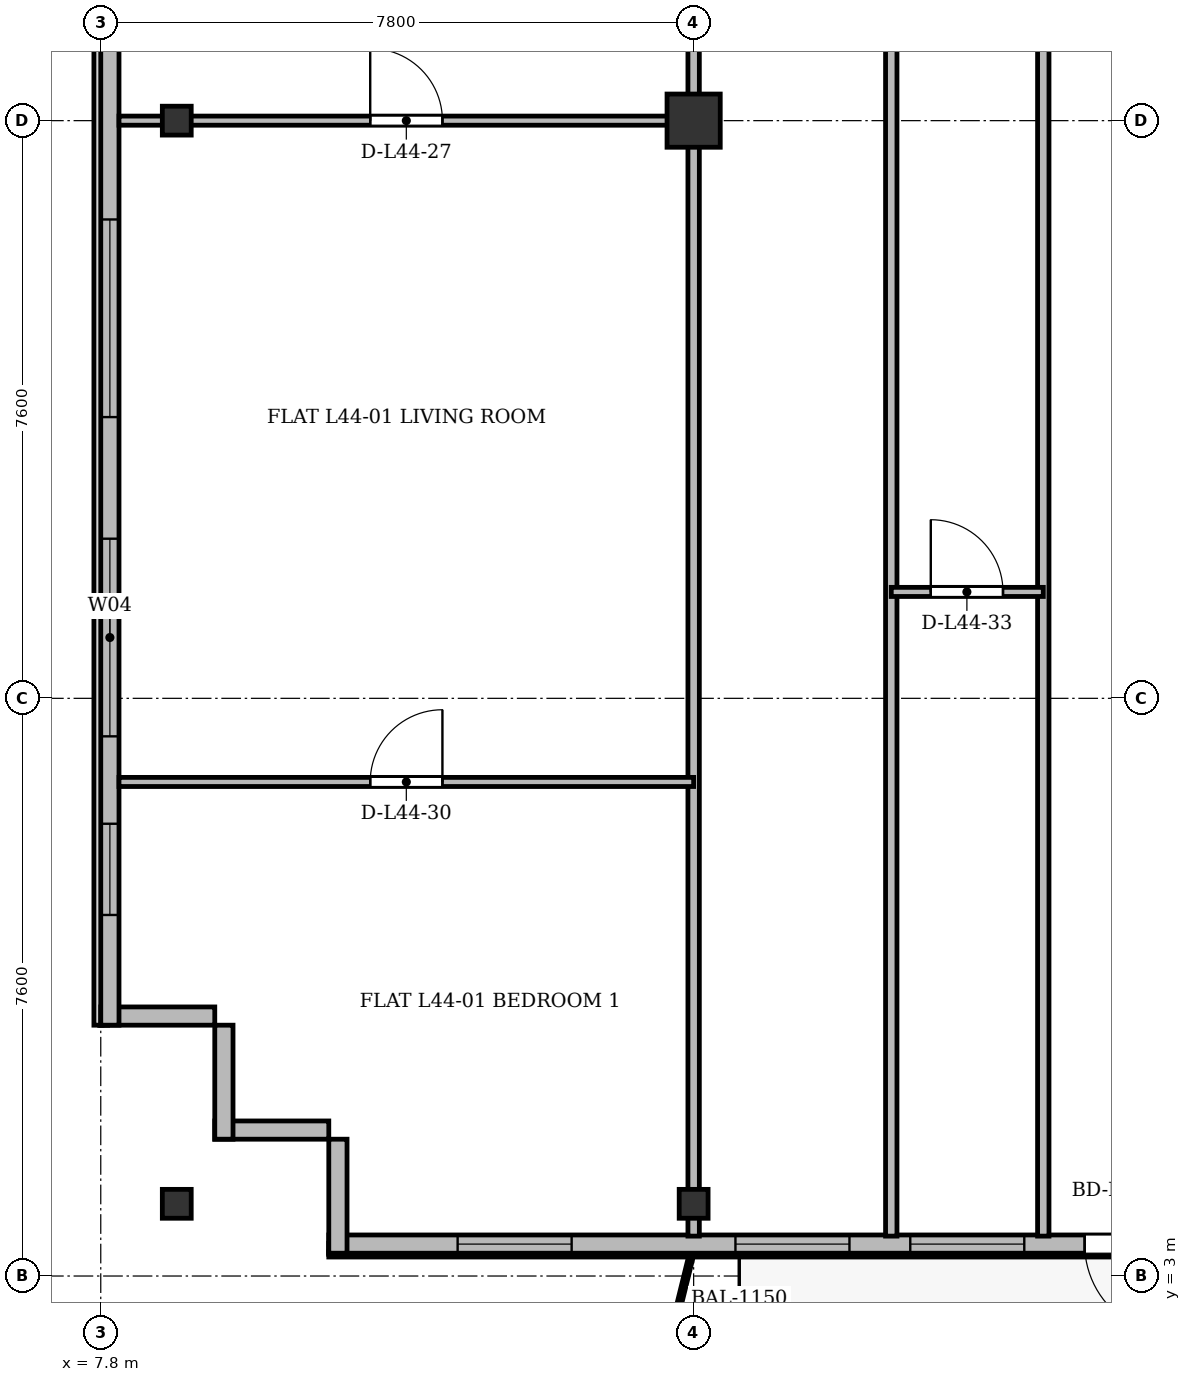
"""IFC4 building model, lengths in metres.
Left out: names, types, materials, properties, quantities, classifications, styles, units other than length and angle.
Written with IfcOpenShell. Run it as: python <this file> out.ifc"""

import sys

from ifc_helpers import new_model, si_unit, direction, frame, frame_2d, origin, origin_2d, place, context, subcontext, project, spatial, rectangle, i_section, extrude, source, transform, mapped, element, fill, save


model = new_model("IFC4")
c1 = context("Model", 3, precision=1e-05, world=origin(), true_north=direction((0.0, 1.0)))
c2 = subcontext(c1, "Body", "Model", "MODEL_VIEW")
j1 = project(units=[si_unit("LENGTHUNIT", "METRE"), si_unit("PLANEANGLEUNIT", "RADIAN")], contexts=[c1])
p1 = place(None, origin())
s1 = spatial("IfcSite", under=j1, at=p1, CompositionType="ELEMENT")
p2 = place(p1, origin())
s2 = spatial("IfcBuilding", under=s1, at=p2, CompositionType="ELEMENT")
p3 = place(p2, frame((0.0, 0.0, 168.1)))
s3 = spatial("IfcBuildingStorey", under=s2, at=p3, CompositionType="ELEMENT", Elevation=168.1)
m1 = source(origin(), c2, "Body", "SweptSolid", [
    extrude(i_section(OverallWidth=0.38, OverallDepth=0.38, WebThickness=0.02, FlangeThickness=0.03, at=origin_2d()), origin(), (0.0, 0.0, 1.0), 3.6),
])
for number, where, z_axis, x_axis in (
    (1, (8.8, 3.95, 0.0), (0.0, 0.0, 1.0), (1.0, 0.0, 0.0)),
    (2, (8.8, 18.2, 0.0), (0.0, 0.0, 1.0), (1.0, 0.0, 0.0)),
    (3, (15.6, 3.95, 0.0), (0.0, 0.0, 1.0), (1.0, 0.0, 0.0)),
):
    element("IfcColumn", number, at=place(p3, frame(where, z_axis=z_axis, x_axis=x_axis)), inside=s3, PredefinedType="COLUMN", context=c2, shape_type="MappedRepresentation", body=[
        mapped(m1, transform((0.0, 0.0, 0.0), x_axis=(1.0, 0.0, 0.0), y_axis=(0.0, 1.0, 0.0), z_axis=(0.0, 0.0, 1.0), scale=1.0)),
    ])
m2 = source(origin(), c2, "Body", "SweptSolid", [
    extrude(rectangle(XDim=0.7, YDim=0.7, at=origin_2d()), origin(), (0.0, 0.0, 1.0), 3.6),
])
p4 = place(p3, frame((15.6, 18.2, 0.0), z_axis=(0.0, 0.0, 1.0), x_axis=(1.0, 0.0, 0.0)))
e4 = element("IfcColumn", 4, at=p4, inside=s3, PredefinedType="COLUMN", context=c2, shape_type="MappedRepresentation", body=[
    mapped(m2, transform((0.0, 0.0, 0.0), x_axis=(1.0, 0.0, 0.0), y_axis=(0.0, 1.0, 0.0), z_axis=(0.0, 0.0, 1.0), scale=1.0)),
])
for number, where, z_axis, x_axis in (
    (5, (10.8, 4.92, 0.0), (0.0, 0.0, 1.0), (-1.0, 0.0, 0.0)),
    (6, (9.42, 4.8, 0.0), (0.0, 0.0, 1.0), (0.0, 1.0, 0.0)),
):
    element("IfcWall", number, at=place(p3, frame(where, z_axis=z_axis, x_axis=x_axis)), inside=s3, PredefinedType="SOLIDWALL", context=c2, shape_type="SweptSolid", body=[
        extrude(rectangle(XDim=1.5, YDim=0.24, at=frame_2d((0.75, 0.0))), origin(), (0.0, 0.0, 1.0), 3.35),
    ])
p5 = place(p3, frame((9.3, 6.42, 0.0), z_axis=(0.0, 0.0, 1.0), x_axis=(-1.0, 0.0, 0.0)))
e7 = element("IfcWall", 7, at=p5, inside=s3, PredefinedType="SOLIDWALL", context=c2, shape_type="SweptSolid", body=[
    extrude(rectangle(XDim=1.5, YDim=0.24, at=frame_2d((0.75, 0.0))), origin(), (0.0, 0.0, 1.0), 2.85),
])
p6 = place(p3, frame((7.92, 6.3, 0.0), z_axis=(0.0, 0.0, 1.0), x_axis=(0.0, 1.0, 0.0)))
e8 = element("IfcWall", 8, at=p6, inside=s3, PredefinedType="SOLIDWALL", context=c2, shape_type="SweptSolid", body=[
    extrude(rectangle(XDim=39.2, YDim=0.24, at=frame_2d((19.6, 0.0))), origin(), (0.0, 0.0, 1.0), 3.35),
])
p7 = place(p6, frame((1.45, 0.0, 0.92)))
e9 = element("IfcOpeningElement", 9, at=p7, cuts=e8, PredefinedType="OPENING", context=c2, shape_type="SweptSolid", body=[
    extrude(rectangle(XDim=1.2, YDim=1.65, at=frame_2d((0.6, 0.825))), frame((0.0, 0.13, 0.0), z_axis=(0.0, -1.0, 0.0), x_axis=(1.0, 0.0, 0.0)), (0.0, 0.0, 1.0), 0.26),
])
p8 = place(p6, frame((3.8, 0.0, 0.92)))
e10 = element("IfcOpeningElement", 10, at=p8, cuts=e8, PredefinedType="OPENING", context=c2, shape_type="SweptSolid", body=[
    extrude(rectangle(XDim=2.6, YDim=1.9, at=frame_2d((1.3, 0.95))), frame((0.0, 0.13, 0.0), z_axis=(0.0, -1.0, 0.0), x_axis=(1.0, 0.0, 0.0)), (0.0, 0.0, 1.0), 0.26),
])
p9 = place(p6, frame((8.0, 0.0, 0.92)))
e11 = element("IfcOpeningElement", 11, at=p9, cuts=e8, PredefinedType="OPENING", context=c2, shape_type="SweptSolid", body=[
    extrude(rectangle(XDim=2.6, YDim=1.9, at=frame_2d((1.3, 0.95))), frame((0.0, 0.13, 0.0), z_axis=(0.0, -1.0, 0.0), x_axis=(1.0, 0.0, 0.0)), (0.0, 0.0, 1.0), 0.26),
])
p10 = place(p6, frame((15.2, 0.0, 0.92)))
e12 = element("IfcOpeningElement", 12, at=p10, cuts=e8, PredefinedType="OPENING", context=c2, shape_type="SweptSolid", body=[
    extrude(rectangle(XDim=2.6, YDim=1.9, at=frame_2d((1.3, 0.95))), frame((0.0, 0.13, 0.0), z_axis=(0.0, -1.0, 0.0), x_axis=(1.0, 0.0, 0.0)), (0.0, 0.0, 1.0), 0.26),
])
p11 = place(p6, frame((29.2, 0.0, 0.92)))
e13 = element("IfcOpeningElement", 13, at=p11, cuts=e8, PredefinedType="OPENING", context=c2, shape_type="SweptSolid", body=[
    extrude(rectangle(XDim=2.6, YDim=1.9, at=frame_2d((1.3, 0.95))), frame((0.0, 0.13, 0.0), z_axis=(0.0, -1.0, 0.0), x_axis=(1.0, 0.0, 0.0)), (0.0, 0.0, 1.0), 0.26),
])
p12 = place(p6, frame((36.85, 0.0, 0.92)))
e14 = element("IfcOpeningElement", 14, at=p12, cuts=e8, PredefinedType="OPENING", context=c2, shape_type="SweptSolid", body=[
    extrude(rectangle(XDim=1.2, YDim=1.65, at=frame_2d((0.6, 0.825))), frame((0.0, 0.13, 0.0), z_axis=(0.0, -1.0, 0.0), x_axis=(1.0, 0.0, 0.0)), (0.0, 0.0, 1.0), 0.26),
])
p13 = place(p3, frame((63.6, 3.42, 0.0), z_axis=(0.0, 0.0, 1.0), x_axis=(-1.0, 0.0, 0.0)))
e15 = element("IfcWall", 15, at=p13, inside=s3, PredefinedType="SOLIDWALL", context=c2, shape_type="SweptSolid", body=[
    extrude(rectangle(XDim=52.8, YDim=0.24, at=frame_2d((26.4, 0.0))), origin(), (0.0, 0.0, 1.0), 3.35),
])
p14 = place(p13, frame((1.62, 0.0, 0.9)))
e16 = element("IfcOpeningElement", 16, at=p14, cuts=e15, PredefinedType="OPENING", context=c2, shape_type="SweptSolid", body=[
    extrude(rectangle(XDim=1.65, YDim=1.85, at=frame_2d((0.825, 0.925))), frame((0.0, 0.13, 0.0), z_axis=(0.0, -1.0, 0.0), x_axis=(1.0, 0.0, 0.0)), (0.0, 0.0, 1.0), 0.26),
])
p15 = place(p13, frame((5.2, 0.0, 0.9)))
e17 = element("IfcOpeningElement", 17, at=p15, cuts=e15, PredefinedType="OPENING", context=c2, shape_type="SweptSolid", body=[
    extrude(rectangle(XDim=1.8, YDim=1.8, at=frame_2d((0.9, 0.9))), frame((0.0, 0.13, 0.0), z_axis=(0.0, -1.0, 0.0), x_axis=(1.0, 0.0, 0.0)), (0.0, 0.0, 1.0), 0.26),
])
p16 = place(p13, frame((7.65, 0.0, 0.9)))
e18 = element("IfcOpeningElement", 18, at=p16, cuts=e15, PredefinedType="OPENING", context=c2, shape_type="SweptSolid", body=[
    extrude(rectangle(XDim=1.5, YDim=1.75, at=frame_2d((0.75, 0.875))), frame((0.0, 0.13, 0.0), z_axis=(0.0, -1.0, 0.0), x_axis=(1.0, 0.0, 0.0)), (0.0, 0.0, 1.0), 0.26),
])
p17 = place(p13, frame((10.25, 0.0, 0.9)))
e19 = element("IfcOpeningElement", 19, at=p17, cuts=e15, PredefinedType="OPENING", context=c2, shape_type="SweptSolid", body=[
    extrude(rectangle(XDim=1.5, YDim=1.75, at=frame_2d((0.75, 0.875))), frame((0.0, 0.13, 0.0), z_axis=(0.0, -1.0, 0.0), x_axis=(1.0, 0.0, 0.0)), (0.0, 0.0, 1.0), 0.26),
])
p18 = place(p13, frame((13.62, 0.0, 0.0)))
e20 = element("IfcOpeningElement", 20, at=p18, cuts=e15, PredefinedType="OPENING", context=c2, shape_type="SweptSolid", body=[
    extrude(rectangle(XDim=1.2, YDim=2.2, at=frame_2d((0.6, 1.1))), frame((0.0, 0.13, 0.0), z_axis=(0.0, -1.0, 0.0), x_axis=(1.0, 0.0, 0.0)), (0.0, 0.0, 1.0), 0.26),
])
p19 = place(p13, frame((15.375, 0.0, 0.9)))
e21 = element("IfcOpeningElement", 21, at=p19, cuts=e15, PredefinedType="OPENING", context=c2, shape_type="SweptSolid", body=[
    extrude(rectangle(XDim=1.65, YDim=1.85, at=frame_2d((0.825, 0.925))), frame((0.0, 0.13, 0.0), z_axis=(0.0, -1.0, 0.0), x_axis=(1.0, 0.0, 0.0)), (0.0, 0.0, 1.0), 0.26),
])
p20 = place(p13, frame((17.7, 0.0, 0.9)))
e22 = element("IfcOpeningElement", 22, at=p20, cuts=e15, PredefinedType="OPENING", context=c2, shape_type="SweptSolid", body=[
    extrude(rectangle(XDim=1.8, YDim=1.8, at=frame_2d((0.9, 0.9))), frame((0.0, 0.13, 0.0), z_axis=(0.0, -1.0, 0.0), x_axis=(1.0, 0.0, 0.0)), (0.0, 0.0, 1.0), 0.26),
])
p21 = place(p13, frame((22.0, 0.0, 0.9)))
e23 = element("IfcOpeningElement", 23, at=p21, cuts=e15, PredefinedType="OPENING", context=c2, shape_type="SweptSolid", body=[
    extrude(rectangle(XDim=2.2, YDim=1.8, at=frame_2d((1.1, 0.9))), frame((0.0, 0.13, 0.0), z_axis=(0.0, -1.0, 0.0), x_axis=(1.0, 0.0, 0.0)), (0.0, 0.0, 1.0), 0.26),
])
p22 = place(p13, frame((28.95, 0.0, 0.9)))
e24 = element("IfcOpeningElement", 24, at=p22, cuts=e15, PredefinedType="OPENING", context=c2, shape_type="SweptSolid", body=[
    extrude(rectangle(XDim=1.5, YDim=1.75, at=frame_2d((0.75, 0.875))), frame((0.0, 0.13, 0.0), z_axis=(0.0, -1.0, 0.0), x_axis=(1.0, 0.0, 0.0)), (0.0, 0.0, 1.0), 0.26),
])
p23 = place(p13, frame((35.6, 0.0, 0.9)))
e25 = element("IfcOpeningElement", 25, at=p23, cuts=e15, PredefinedType="OPENING", context=c2, shape_type="SweptSolid", body=[
    extrude(rectangle(XDim=2.0, YDim=1.95, at=frame_2d((1.0, 0.975))), frame((0.0, 0.13, 0.0), z_axis=(0.0, -1.0, 0.0), x_axis=(1.0, 0.0, 0.0)), (0.0, 0.0, 1.0), 0.26),
])
p24 = place(p13, frame((41.656, 0.0, 0.0)))
e26 = element("IfcOpeningElement", 26, at=p24, cuts=e15, PredefinedType="OPENING", context=c2, shape_type="SweptSolid", body=[
    extrude(rectangle(XDim=1.2, YDim=2.2, at=frame_2d((0.6, 1.1))), frame((0.0, 0.13, 0.0), z_axis=(0.0, -1.0, 0.0), x_axis=(1.0, 0.0, 0.0)), (0.0, 0.0, 1.0), 0.26),
])
p25 = place(p13, frame((43.65, 0.0, 0.9)))
e27 = element("IfcOpeningElement", 27, at=p25, cuts=e15, PredefinedType="OPENING", context=c2, shape_type="SweptSolid", body=[
    extrude(rectangle(XDim=1.5, YDim=1.75, at=frame_2d((0.75, 0.875))), frame((0.0, 0.13, 0.0), z_axis=(0.0, -1.0, 0.0), x_axis=(1.0, 0.0, 0.0)), (0.0, 0.0, 1.0), 0.26),
])
p26 = place(p13, frame((45.95, 0.0, 0.9)))
e28 = element("IfcOpeningElement", 28, at=p26, cuts=e15, PredefinedType="OPENING", context=c2, shape_type="SweptSolid", body=[
    extrude(rectangle(XDim=1.5, YDim=1.75, at=frame_2d((0.75, 0.875))), frame((0.0, 0.13, 0.0), z_axis=(0.0, -1.0, 0.0), x_axis=(1.0, 0.0, 0.0)), (0.0, 0.0, 1.0), 0.26),
])
p27 = place(p13, frame((49.605, 0.0, 0.9)))
e29 = element("IfcOpeningElement", 29, at=p27, cuts=e15, PredefinedType="OPENING", context=c2, shape_type="SweptSolid", body=[
    extrude(rectangle(XDim=1.5, YDim=1.75, at=frame_2d((0.75, 0.875))), frame((0.0, 0.13, 0.0), z_axis=(0.0, -1.0, 0.0), x_axis=(1.0, 0.0, 0.0)), (0.0, 0.0, 1.0), 0.26),
])
p28 = place(p3, frame((10.92, 3.3, 0.0), z_axis=(0.0, 0.0, 1.0), x_axis=(0.0, 1.0, 0.0)))
e30 = element("IfcWall", 30, at=p28, inside=s3, PredefinedType="SOLIDWALL", context=c2, shape_type="SweptSolid", body=[
    extrude(rectangle(XDim=1.5, YDim=0.24, at=frame_2d((0.75, 0.0))), origin(), (0.0, 0.0, 1.0), 2.75),
])
p29 = place(p3, frame((15.6, 3.525, 0.0), z_axis=(0.0, 0.0, 1.0), x_axis=(0.0, 1.0, 0.0)))
e31 = element("IfcWall", 31, at=p29, inside=s3, PredefinedType="PARTITIONING", context=c2, shape_type="SweptSolid", body=[
    extrude(rectangle(XDim=27.275, YDim=0.15, at=frame_2d((13.638, 0.0))), origin(), (0.0, 0.0, 1.0), 2.85),
])
p30 = place(p3, frame((8.04, 18.2, 0.0), z_axis=(0.0, 0.0, 1.0), x_axis=(1.0, 0.0, 0.0)))
e32 = element("IfcWall", 32, at=p30, inside=s3, PredefinedType="PARTITIONING", context=c2, shape_type="SweptSolid", body=[
    extrude(rectangle(XDim=7.56, YDim=0.12, at=frame_2d((3.78, 0.0))), origin(), (0.0, 0.0, 1.0), 2.75),
])
p31 = place(p30, frame((3.305, 0.0, 0.0)))
e33 = element("IfcOpeningElement", 33, at=p31, cuts=e32, PredefinedType="OPENING", context=c2, shape_type="SweptSolid", body=[
    extrude(rectangle(XDim=0.95, YDim=2.15, at=frame_2d((0.475, 1.075))), frame((0.0, 0.07, 0.0), z_axis=(0.0, -1.0, 0.0), x_axis=(1.0, 0.0, 0.0)), (0.0, 0.0, 1.0), 0.14),
])
p32 = place(p3, frame((8.04, 9.5, 0.0), z_axis=(0.0, 0.0, 1.0), x_axis=(1.0, 0.0, 0.0)))
e34 = element("IfcWall", 34, at=p32, inside=s3, PredefinedType="PARTITIONING", context=c2, shape_type="SweptSolid", body=[
    extrude(rectangle(XDim=7.56, YDim=0.12, at=frame_2d((3.78, 0.0))), origin(), (0.0, 0.0, 1.0), 2.85),
])
p33 = place(p32, frame((3.305, 0.0, 0.0)))
e35 = element("IfcOpeningElement", 35, at=p33, cuts=e34, PredefinedType="OPENING", context=c2, shape_type="SweptSolid", body=[
    extrude(rectangle(XDim=0.95, YDim=2.15, at=frame_2d((0.475, 1.075))), frame((0.0, 0.07, 0.0), z_axis=(0.0, -1.0, 0.0), x_axis=(1.0, 0.0, 0.0)), (0.0, 0.0, 1.0), 0.14),
])
for number, where, z_axis, x_axis in (
    (36, (18.2, 3.525, 0.0), (0.0, 0.0, 1.0), (0.0, 1.0, 0.0)),
    (37, (20.2, 3.525, 0.0), (0.0, 0.0, 1.0), (0.0, 1.0, 0.0)),
):
    element("IfcWall", number, at=place(p3, frame(where, z_axis=z_axis, x_axis=x_axis)), inside=s3, PredefinedType="PARTITIONING", context=c2, shape_type="SweptSolid", body=[
        extrude(rectangle(XDim=27.275, YDim=0.15, at=frame_2d((13.638, 0.0))), origin(), (0.0, 0.0, 1.0), 2.75),
    ])
p34 = place(p3, frame((18.2, 12.0, 0.0), z_axis=(0.0, 0.0, 1.0), x_axis=(1.0, 0.0, 0.0)))
e38 = element("IfcWall", 38, at=p34, inside=s3, PredefinedType="PARTITIONING", context=c2, shape_type="SweptSolid", body=[
    extrude(rectangle(XDim=2.0, YDim=0.12, at=frame_2d((1.0, 0.0))), origin(), (0.0, 0.0, 1.0), 3.35),
])
p35 = place(p34, frame((0.52, 0.0, 0.0)))
e39 = element("IfcOpeningElement", 39, at=p35, cuts=e38, PredefinedType="OPENING", context=c2, shape_type="SweptSolid", body=[
    extrude(rectangle(XDim=0.95, YDim=2.15, at=frame_2d((0.475, 1.075))), frame((0.0, 0.07, 0.0), z_axis=(0.0, -1.0, 0.0), x_axis=(1.0, 0.0, 0.0)), (0.0, 0.0, 1.0), 0.14),
])
m3 = source(origin(), c2, "Body", "SweptSolid", [
    extrude(rectangle(XDim=1.2, YDim=1.65, at=frame_2d((0.6, 0.825))), frame((0.0, 0.03, 0.0), z_axis=(0.0, -1.0, 0.0), x_axis=(1.0, 0.0, 0.0)), (0.0, 0.0, 1.0), 0.06),
])
p36 = place(p7, origin())
e40 = element("IfcWindow", 40, at=p36, inside=s3, PartitioningType="SINGLE_PANEL", PredefinedType="WINDOW", context=c2, shape_type="MappedRepresentation", body=[
    mapped(m3, transform((0.0, 0.0, 0.0), x_axis=(1.0, 0.0, 0.0), y_axis=(0.0, 1.0, 0.0), z_axis=(0.0, 0.0, 1.0), scale=1.0)),
])
fill(e9, e40)
m4 = source(origin(), c2, "Body", "SweptSolid", [
    extrude(rectangle(XDim=2.6, YDim=1.9, at=frame_2d((1.3, 0.95))), frame((0.0, 0.03, 0.0), z_axis=(0.0, -1.0, 0.0), x_axis=(1.0, 0.0, 0.0)), (0.0, 0.0, 1.0), 0.06),
])
p37 = place(p8, origin())
e41 = element("IfcWindow", 41, at=p37, inside=s3, PartitioningType="SINGLE_PANEL", PredefinedType="WINDOW", context=c2, shape_type="MappedRepresentation", body=[
    mapped(m4, transform((0.0, 0.0, 0.0), x_axis=(1.0, 0.0, 0.0), y_axis=(0.0, 1.0, 0.0), z_axis=(0.0, 0.0, 1.0), scale=1.0)),
])
fill(e10, e41)
p38 = place(p9, origin())
e42 = element("IfcWindow", 42, at=p38, inside=s3, PartitioningType="SINGLE_PANEL", PredefinedType="WINDOW", context=c2, shape_type="MappedRepresentation", body=[
    mapped(m4, transform((0.0, 0.0, 0.0), x_axis=(1.0, 0.0, 0.0), y_axis=(0.0, 1.0, 0.0), z_axis=(0.0, 0.0, 1.0), scale=1.0)),
])
fill(e11, e42)
m5 = source(origin(), c2, "Body", "SweptSolid", [
    extrude(rectangle(XDim=1.2, YDim=2.2, at=frame_2d((0.6, 1.1))), frame((0.0, 0.025, 0.0), z_axis=(0.0, -1.0, 0.0), x_axis=(1.0, 0.0, 0.0)), (0.0, 0.0, 1.0), 0.05),
])
p39 = place(p24, origin())
e43 = element("IfcDoor", 43, at=p39, inside=s3, OperationType="SINGLE_SWING_LEFT", PredefinedType="DOOR", context=c2, shape_type="MappedRepresentation", body=[
    mapped(m5, transform((0.0, 0.0, 0.0), x_axis=(1.0, 0.0, 0.0), y_axis=(0.0, 1.0, 0.0), z_axis=(0.0, 0.0, 1.0), scale=1.0)),
])
fill(e26, e43)
m6 = source(origin(), c2, "Body", "SweptSolid", [
    extrude(rectangle(XDim=1.5, YDim=1.75, at=frame_2d((0.75, 0.875))), frame((0.0, 0.03, 0.0), z_axis=(0.0, -1.0, 0.0), x_axis=(1.0, 0.0, 0.0)), (0.0, 0.0, 1.0), 0.06),
])
p40 = place(p25, origin())
e44 = element("IfcWindow", 44, at=p40, inside=s3, PartitioningType="SINGLE_PANEL", PredefinedType="WINDOW", context=c2, shape_type="MappedRepresentation", body=[
    mapped(m6, transform((0.0, 0.0, 0.0), x_axis=(1.0, 0.0, 0.0), y_axis=(0.0, 1.0, 0.0), z_axis=(0.0, 0.0, 1.0), scale=1.0)),
])
fill(e27, e44)
p41 = place(p26, origin())
e45 = element("IfcWindow", 45, at=p41, inside=s3, PartitioningType="SINGLE_PANEL", PredefinedType="WINDOW", context=c2, shape_type="MappedRepresentation", body=[
    mapped(m6, transform((0.0, 0.0, 0.0), x_axis=(1.0, 0.0, 0.0), y_axis=(0.0, 1.0, 0.0), z_axis=(0.0, 0.0, 1.0), scale=1.0)),
])
fill(e28, e45)
p42 = place(p27, origin())
e46 = element("IfcWindow", 46, at=p42, inside=s3, PartitioningType="SINGLE_PANEL", PredefinedType="WINDOW", context=c2, shape_type="MappedRepresentation", body=[
    mapped(m6, transform((0.0, 0.0, 0.0), x_axis=(1.0, 0.0, 0.0), y_axis=(0.0, 1.0, 0.0), z_axis=(0.0, 0.0, 1.0), scale=1.0)),
])
fill(e29, e46)
m7 = source(origin(), c2, "Body", "SweptSolid", [
    extrude(rectangle(XDim=0.95, YDim=2.15, at=frame_2d((0.475, 1.075))), frame((0.0, 0.025, 0.0), z_axis=(0.0, -1.0, 0.0), x_axis=(1.0, 0.0, 0.0)), (0.0, 0.0, 1.0), 0.05),
])
p43 = place(p31, origin())
e47 = element("IfcDoor", 47, at=p43, inside=s3, OperationType="SINGLE_SWING_LEFT", PredefinedType="DOOR", context=c2, shape_type="MappedRepresentation", body=[
    mapped(m7, transform((0.0, 0.0, 0.0), x_axis=(1.0, 0.0, 0.0), y_axis=(0.0, 1.0, 0.0), z_axis=(0.0, 0.0, 1.0), scale=1.0)),
])
fill(e33, e47)
p44 = place(p33, origin())
e48 = element("IfcDoor", 48, at=p44, inside=s3, OperationType="SINGLE_SWING_RIGHT", PredefinedType="DOOR", context=c2, shape_type="MappedRepresentation", body=[
    mapped(m7, transform((0.0, 0.0, 0.0), x_axis=(1.0, 0.0, 0.0), y_axis=(0.0, 1.0, 0.0), z_axis=(0.0, 0.0, 1.0), scale=1.0)),
])
fill(e35, e48)
p45 = place(p35, origin())
e49 = element("IfcDoor", 49, at=p45, inside=s3, OperationType="SINGLE_SWING_LEFT", PredefinedType="DOOR", context=c2, shape_type="MappedRepresentation", body=[
    mapped(m7, transform((0.0, 0.0, 0.0), x_axis=(1.0, 0.0, 0.0), y_axis=(0.0, 1.0, 0.0), z_axis=(0.0, 0.0, 1.0), scale=1.0)),
])
fill(e39, e49)
save(model, sys.argv[1])
